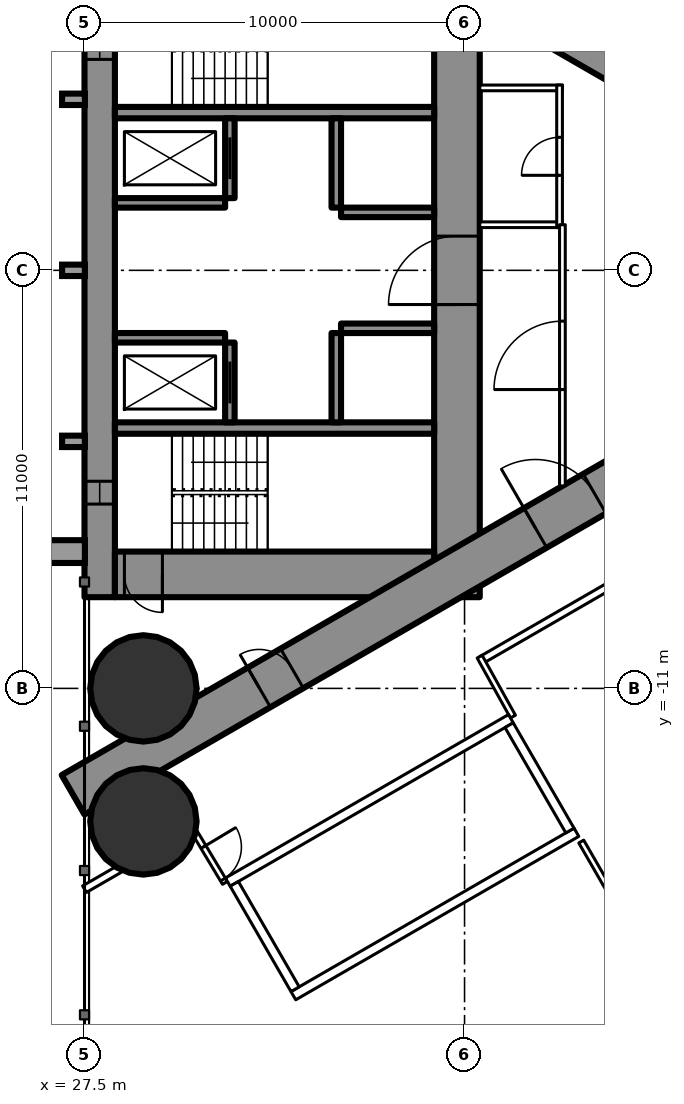
"""IFC4 building model, lengths in metres.
Left out: names, types, materials, properties, quantities, classifications, styles, units other than length and angle.
Written with IfcOpenShell. Run it as: python <this file> out.ifc"""

import sys

from ifc_helpers import new_model, si_unit, direction, frame, frame_2d, origin, origin_2d, place, context, subcontext, project, spatial, rectangle, hollow_circle, extrude, element, fill, save


model = new_model("IFC4")
c1 = context("Model", 3, precision=1e-05, world=origin(), true_north=direction((0.0, 1.0)))
c2 = subcontext(c1, "Body", "Model", "MODEL_VIEW")
j1 = project(units=[si_unit("LENGTHUNIT", "METRE"), si_unit("PLANEANGLEUNIT", "RADIAN")], contexts=[c1])
p1 = place(None, origin())
s1 = spatial("IfcSite", under=j1, at=p1, CompositionType="ELEMENT")
p2 = place(p1, origin())
s2 = spatial("IfcBuilding", under=s1, at=p2, CompositionType="ELEMENT")
p3 = place(p2, frame((0.0, 0.0, 77.5)))
s3 = spatial("IfcBuildingStorey", under=s2, at=p3, CompositionType="ELEMENT", Elevation=77.5)
for number, where, z_axis, x_axis in (
    (1, (29.05, -11.0, 0.0), (0.0, 0.0, 1.0), (1.0, 0.0, 0.0)),
    (2, (29.05, -14.5, 0.0), (0.0, 0.0, 1.0), (1.0, 0.0, 0.0)),
):
    element("IfcColumn", number, at=place(p3, frame(where, z_axis=z_axis, x_axis=x_axis)), inside=s3, PredefinedType="COLUMN", context=c2, shape_type="SweptSolid", body=[
        extrude(hollow_circle(Radius=1.4, WallThickness=0.12, at=origin_2d()), origin(), (0.0, 0.0, 1.0), 3.5),
    ])
p4 = place(p3, frame((27.9, -8.6, 0.0), z_axis=(0.0, 0.0, 1.0), x_axis=(0.0, 1.0, 0.0)))
e3 = element("IfcWall", 3, at=p4, inside=s3, PredefinedType="SHEAR", context=c2, shape_type="SweptSolid", body=[
    extrude(rectangle(XDim=17.2, YDim=0.8, at=frame_2d((8.6, 0.0))), origin(), (0.0, 0.0, 1.0), 3.5),
])
p5 = place(p4, frame((2.45, 0.0, 0.6)))
e4 = element("IfcOpeningElement", 4, at=p5, cuts=e3, PredefinedType="OPENING", context=c2, shape_type="SweptSolid", body=[
    extrude(rectangle(XDim=0.6, YDim=2.1, at=frame_2d((0.3, 1.05))), frame((0.0, 0.41, 0.0), z_axis=(0.0, -1.0, 0.0), x_axis=(1.0, 0.0, 0.0)), (0.0, 0.0, 1.0), 0.82),
])
p6 = place(p4, frame((14.15, 0.0, 0.6)))
e5 = element("IfcOpeningElement", 5, at=p6, cuts=e3, PredefinedType="OPENING", context=c2, shape_type="SweptSolid", body=[
    extrude(rectangle(XDim=0.6, YDim=2.1, at=frame_2d((0.3, 1.05))), frame((0.0, 0.41, 0.0), z_axis=(0.0, -1.0, 0.0), x_axis=(1.0, 0.0, 0.0)), (0.0, 0.0, 1.0), 0.82),
])
p7 = place(p3, frame((37.3, -8.6, 0.0), z_axis=(0.0, 0.0, 1.0), x_axis=(0.0, 1.0, 0.0)))
e6 = element("IfcWall", 6, at=p7, inside=s3, PredefinedType="SHEAR", context=c2, shape_type="SweptSolid", body=[
    extrude(rectangle(XDim=17.2, YDim=1.2, at=frame_2d((8.6, 0.0))), origin(), (0.0, 0.0, 1.0), 3.5),
])
p8 = place(p7, frame((7.7, 0.0, 0.0)))
e7 = element("IfcOpeningElement", 7, at=p8, cuts=e6, PredefinedType="OPENING", context=c2, shape_type="SweptSolid", body=[
    extrude(rectangle(XDim=1.8, YDim=2.2, at=frame_2d((0.9, 1.1))), frame((0.0, 0.61, 0.0), z_axis=(0.0, -1.0, 0.0), x_axis=(1.0, 0.0, 0.0)), (0.0, 0.0, 1.0), 1.22),
])
p9 = place(p3, frame((28.3, -8.0, 0.0), z_axis=(0.0, 0.0, 1.0), x_axis=(1.0, 0.0, 0.0)))
e8 = element("IfcWall", 8, at=p9, inside=s3, PredefinedType="SHEAR", context=c2, shape_type="SweptSolid", body=[
    extrude(rectangle(XDim=8.4, YDim=1.2, at=frame_2d((4.2, 0.0))), origin(), (0.0, 0.0, 1.0), 3.5),
])
p10 = place(p9, frame((0.25, 0.0, 0.0)))
e9 = element("IfcOpeningElement", 9, at=p10, cuts=e8, PredefinedType="OPENING", context=c2, shape_type="SweptSolid", body=[
    extrude(rectangle(XDim=1.0, YDim=2.2, at=frame_2d((0.5, 1.1))), frame((0.0, 0.61, 0.0), z_axis=(0.0, -1.0, 0.0), x_axis=(1.0, 0.0, 0.0)), (0.0, 0.0, 1.0), 1.22),
])
for number, where, z_axis, x_axis in (
    (10, (28.3, -4.15, 0.0), (0.0, 0.0, 1.0), (1.0, 0.0, 0.0)),
    (11, (28.3, 4.15, 0.0), (0.0, 0.0, 1.0), (1.0, 0.0, 0.0)),
):
    element("IfcWall", number, at=place(p3, frame(where, z_axis=z_axis, x_axis=x_axis)), inside=s3, PredefinedType="SHEAR", context=c2, shape_type="SweptSolid", body=[
        extrude(rectangle(XDim=8.4, YDim=0.3, at=frame_2d((4.2, 0.0))), origin(), (0.0, 0.0, 1.0), 3.5),
    ])
p11 = place(p3, frame((31.325, -4.0, 0.0), z_axis=(0.0, 0.0, 1.0), x_axis=(0.0, 1.0, 0.0)))
e12 = element("IfcWall", 12, at=p11, inside=s3, PredefinedType="SHEAR", context=c2, shape_type="SweptSolid", body=[
    extrude(rectangle(XDim=2.1, YDim=0.25, at=frame_2d((1.05, 0.0))), origin(), (0.0, 0.0, 1.0), 3.5),
])
p12 = place(p11, frame((0.5, 0.0, 0.0)))
e13 = element("IfcOpeningElement", 13, at=p12, cuts=e12, PredefinedType="OPENING", context=c2, shape_type="SweptSolid", body=[
    extrude(rectangle(XDim=1.1, YDim=2.2, at=frame_2d((0.55, 1.1))), frame((0.0, 0.135, 0.0), z_axis=(0.0, -1.0, 0.0), x_axis=(1.0, 0.0, 0.0)), (0.0, 0.0, 1.0), 0.27),
])
p13 = place(p3, frame((34.125, -4.0, 0.0), z_axis=(0.0, 0.0, 1.0), x_axis=(0.0, 1.0, 0.0)))
e14 = element("IfcWall", 14, at=p13, inside=s3, PredefinedType="SHEAR", context=c2, shape_type="SweptSolid", body=[
    extrude(rectangle(XDim=2.35, YDim=0.25, at=frame_2d((1.175, 0.0))), origin(), (0.0, 0.0, 1.0), 3.5),
])
p14 = place(p3, frame((28.3, -1.775, 0.0), z_axis=(0.0, 0.0, 1.0), x_axis=(1.0, 0.0, 0.0)))
e15 = element("IfcWall", 15, at=p14, inside=s3, PredefinedType="SHEAR", context=c2, shape_type="SweptSolid", body=[
    extrude(rectangle(XDim=2.9, YDim=0.25, at=frame_2d((1.45, 0.0))), origin(), (0.0, 0.0, 1.0), 3.5),
])
p15 = place(p3, frame((34.25, -1.525, 0.0), z_axis=(0.0, 0.0, 1.0), x_axis=(1.0, 0.0, 0.0)))
e16 = element("IfcWall", 16, at=p15, inside=s3, PredefinedType="SHEAR", context=c2, shape_type="SweptSolid", body=[
    extrude(rectangle(XDim=2.45, YDim=0.25, at=frame_2d((1.225, 0.0))), origin(), (0.0, 0.0, 1.0), 3.5),
])
p16 = place(p3, frame((31.325, 1.9, 0.0), z_axis=(0.0, 0.0, 1.0), x_axis=(0.0, 1.0, 0.0)))
e17 = element("IfcWall", 17, at=p16, inside=s3, PredefinedType="SHEAR", context=c2, shape_type="SweptSolid", body=[
    extrude(rectangle(XDim=2.1, YDim=0.25, at=frame_2d((1.05, 0.0))), origin(), (0.0, 0.0, 1.0), 3.5),
])
p17 = place(p16, frame((0.5, 0.0, 0.0)))
e18 = element("IfcOpeningElement", 18, at=p17, cuts=e17, PredefinedType="OPENING", context=c2, shape_type="SweptSolid", body=[
    extrude(rectangle(XDim=1.1, YDim=2.2, at=frame_2d((0.55, 1.1))), frame((0.0, 0.135, 0.0), z_axis=(0.0, -1.0, 0.0), x_axis=(1.0, 0.0, 0.0)), (0.0, 0.0, 1.0), 0.27),
])
p18 = place(p3, frame((34.125, 1.65, 0.0), z_axis=(0.0, 0.0, 1.0), x_axis=(0.0, 1.0, 0.0)))
e19 = element("IfcWall", 19, at=p18, inside=s3, PredefinedType="SHEAR", context=c2, shape_type="SweptSolid", body=[
    extrude(rectangle(XDim=2.35, YDim=0.25, at=frame_2d((1.175, 0.0))), origin(), (0.0, 0.0, 1.0), 3.5),
])
p19 = place(p3, frame((28.3, 1.775, 0.0), z_axis=(0.0, 0.0, 1.0), x_axis=(1.0, 0.0, 0.0)))
e20 = element("IfcWall", 20, at=p19, inside=s3, PredefinedType="SHEAR", context=c2, shape_type="SweptSolid", body=[
    extrude(rectangle(XDim=2.9, YDim=0.25, at=frame_2d((1.45, 0.0))), origin(), (0.0, 0.0, 1.0), 3.5),
])
p20 = place(p3, frame((34.25, 1.525, 0.0), z_axis=(0.0, 0.0, 1.0), x_axis=(1.0, 0.0, 0.0)))
e21 = element("IfcWall", 21, at=p20, inside=s3, PredefinedType="SHEAR", context=c2, shape_type="SweptSolid", body=[
    extrude(rectangle(XDim=2.45, YDim=0.25, at=frame_2d((1.225, 0.0))), origin(), (0.0, 0.0, 1.0), 3.5),
])
p21 = place(p3, frame((27.2, -13.8, 0.0), z_axis=(0.0, 0.0, 1.0), x_axis=(0.866027159892, 0.499996958321, 0.0)))
e22 = element("IfcWall", 22, at=p21, inside=s3, PredefinedType="SHEAR", context=c2, shape_type="SweptSolid", body=[
    extrude(rectangle(XDim=27.947, YDim=1.2, at=frame_2d((13.973, 0.0))), origin(), (0.0, 0.0, 1.0), 3.5),
])
p22 = place(p21, frame((5.65, 0.0, 0.0)))
e23 = element("IfcOpeningElement", 23, at=p22, cuts=e22, PredefinedType="OPENING", context=c2, shape_type="SweptSolid", body=[
    extrude(rectangle(XDim=1.0, YDim=2.2, at=frame_2d((0.5, 1.1))), frame((0.0, 0.61, 0.0), z_axis=(0.0, -1.0, 0.0), x_axis=(1.0, 0.0, 0.0)), (0.0, 0.0, 1.0), 1.22),
])
p23 = place(p21, frame((14.045, 0.0, 0.0)))
e24 = element("IfcOpeningElement", 24, at=p23, cuts=e22, PredefinedType="OPENING", context=c2, shape_type="SweptSolid", body=[
    extrude(rectangle(XDim=1.8, YDim=2.2, at=frame_2d((0.9, 1.1))), frame((0.0, 0.61, 0.0), z_axis=(0.0, -1.0, 0.0), x_axis=(1.0, 0.0, 0.0)), (0.0, 0.0, 1.0), 1.22),
])
p24 = place(p3, frame((27.2, 13.8, 0.0), z_axis=(0.0, 0.0, 1.0), x_axis=(0.866024515034, -0.500001539357, 0.0)))
e25 = element("IfcWall", 25, at=p24, inside=s3, PredefinedType="SHEAR", context=c2, shape_type="SweptSolid", body=[
    extrude(rectangle(XDim=26.907, YDim=1.2, at=frame_2d((13.454, 0.0))), origin(), (0.0, 0.0, 1.0), 3.5),
])
p25 = place(p24, frame((4.5, 0.0, 0.0)))
e26 = element("IfcOpeningElement", 26, at=p25, cuts=e25, PredefinedType="OPENING", context=c2, shape_type="SweptSolid", body=[
    extrude(rectangle(XDim=1.0, YDim=2.2, at=frame_2d((0.5, 1.1))), frame((0.0, 0.61, 0.0), z_axis=(0.0, -1.0, 0.0), x_axis=(1.0, 0.0, 0.0)), (0.0, 0.0, 1.0), 1.22),
])
p26 = place(p24, frame((12.545, 0.0, 0.0)))
e27 = element("IfcOpeningElement", 27, at=p26, cuts=e25, PredefinedType="OPENING", context=c2, shape_type="SweptSolid", body=[
    extrude(rectangle(XDim=1.8, YDim=2.2, at=frame_2d((0.9, 1.1))), frame((0.0, 0.61, 0.0), z_axis=(0.0, -1.0, 0.0), x_axis=(1.0, 0.0, 0.0)), (0.0, 0.0, 1.0), 1.22),
])
p27 = place(p3, frame((29.911, -25.002, 0.0), z_axis=(0.0, 0.0, 1.0), x_axis=(0.935736448066, 0.352700013836, 0.0)))
e28 = element("IfcWall", 28, at=p27, inside=s3, PredefinedType="SHEAR", context=c2, shape_type="SweptSolid", body=[
    extrude(rectangle(XDim=14.505, YDim=1.4, at=frame_2d((7.252, 0.0))), origin(), (0.0, 0.0, 1.0), 3.5),
])
p28 = place(p27, frame((5.752, 0.0, 0.6)))
e29 = element("IfcOpeningElement", 29, at=p28, cuts=e28, PredefinedType="OPENING", context=c2, shape_type="SweptSolid", body=[
    extrude(rectangle(XDim=3.0, YDim=1.2, at=frame_2d((1.5, 0.6))), frame((0.0, 0.71, 0.0), z_axis=(0.0, -1.0, 0.0), x_axis=(1.0, 0.0, 0.0)), (0.0, 0.0, 1.0), 1.42),
])
p29 = place(p3, frame((40.57, -15.03, 0.0), z_axis=(0.0, 0.0, 1.0), x_axis=(0.500012993597, -0.866017901798, 0.0)))
e30 = element("IfcWall", 30, at=p29, inside=s3, PredefinedType="PARTITIONING", context=c2, shape_type="SweptSolid", body=[
    extrude(rectangle(XDim=4.243, YDim=0.15, at=frame_2d((2.122, 0.0))), origin(), (0.0, 0.0, 1.0), 3.25),
])
p30 = place(p3, frame((27.5, -16.282, 0.0), z_axis=(0.0, 0.0, 1.0), x_axis=(0.866039938485, 0.499974824316, 0.0)))
e31 = element("IfcWall", 31, at=p30, inside=s3, PredefinedType="PARTITIONING", context=c2, shape_type="SweptSolid", body=[
    extrude(rectangle(XDim=3.238, YDim=0.2, at=frame_2d((1.619, 0.0))), origin(), (0.0, 0.0, 1.0), 3.25),
])
p31 = place(p3, frame((37.96, -10.243, 0.0), z_axis=(0.0, 0.0, 1.0), x_axis=(0.866026429433, 0.499998223521, 0.0)))
e32 = element("IfcWall", 32, at=p31, inside=s3, PredefinedType="PARTITIONING", context=c2, shape_type="SweptSolid", body=[
    extrude(rectangle(XDim=20.487, YDim=0.2, at=frame_2d((10.243, 0.0))), origin(), (0.0, 0.0, 1.0), 3.25),
])
p32 = place(p31, frame((14.142, 0.0, 0.0)))
e33 = element("IfcOpeningElement", 33, at=p32, cuts=e32, PredefinedType="OPENING", context=c2, shape_type="SweptSolid", body=[
    extrude(rectangle(XDim=1.8, YDim=2.2, at=frame_2d((0.9, 1.1))), frame((0.0, 0.11, 0.0), z_axis=(0.0, -1.0, 0.0), x_axis=(1.0, 0.0, 0.0)), (0.0, 0.0, 1.0), 0.22),
])
p33 = place(p31, frame((17.836, 0.0, 0.0)))
e34 = element("IfcOpeningElement", 34, at=p33, cuts=e32, PredefinedType="OPENING", context=c2, shape_type="SweptSolid", body=[
    extrude(rectangle(XDim=1.8, YDim=2.04, at=frame_2d((0.9, 1.02))), frame((0.0, 0.11, 0.0), z_axis=(0.0, -1.0, 0.0), x_axis=(1.0, 0.0, 0.0)), (0.0, 0.0, 1.0), 0.22),
])
p34 = place(p31, frame((5.55, 0.0, 0.0)))
e35 = element("IfcOpeningElement", 35, at=p34, cuts=e32, PredefinedType="OPENING", context=c2, shape_type="SweptSolid", body=[
    extrude(rectangle(XDim=2.0, YDim=2.4, at=frame_2d((1.0, 1.2))), frame((0.0, 0.11, 0.0), z_axis=(0.0, -1.0, 0.0), x_axis=(1.0, 0.0, 0.0)), (0.0, 0.0, 1.0), 0.22),
])
p35 = place(p3, frame((36.834, 10.894, 0.0), z_axis=(0.0, 0.0, 1.0), x_axis=(0.866028157229, -0.499995230863, 0.0)))
e36 = element("IfcWall", 36, at=p35, inside=s3, PredefinedType="PARTITIONING", context=c2, shape_type="SweptSolid", body=[
    extrude(rectangle(XDim=21.667, YDim=0.2, at=frame_2d((10.833, 0.0))), origin(), (0.0, 0.0, 1.0), 3.25),
])
p36 = place(p35, frame((19.076, 0.0, 0.0)))
e37 = element("IfcOpeningElement", 37, at=p36, cuts=e36, PredefinedType="OPENING", context=c2, shape_type="SweptSolid", body=[
    extrude(rectangle(XDim=1.8, YDim=2.04, at=frame_2d((0.9, 1.02))), frame((0.0, 0.11, 0.0), z_axis=(0.0, -1.0, 0.0), x_axis=(1.0, 0.0, 0.0)), (0.0, 0.0, 1.0), 0.22),
])
p37 = place(p35, frame((13.274, 0.0, 0.0)))
e38 = element("IfcOpeningElement", 38, at=p37, cuts=e36, PredefinedType="OPENING", context=c2, shape_type="SweptSolid", body=[
    extrude(rectangle(XDim=1.8, YDim=2.2, at=frame_2d((0.9, 1.1))), frame((0.0, 0.11, 0.0), z_axis=(0.0, -1.0, 0.0), x_axis=(1.0, 0.0, 0.0)), (0.0, 0.0, 1.0), 0.22),
])
p38 = place(p35, frame((4.602, 0.0, 0.0)))
e39 = element("IfcOpeningElement", 39, at=p38, cuts=e36, PredefinedType="OPENING", context=c2, shape_type="SweptSolid", body=[
    extrude(rectangle(XDim=1.8, YDim=2.2, at=frame_2d((0.9, 1.1))), frame((0.0, 0.11, 0.0), z_axis=(0.0, -1.0, 0.0), x_axis=(1.0, 0.0, 0.0)), (0.0, 0.0, 1.0), 0.22),
])
p39 = place(p3, frame((30.267, -14.569, 0.0), z_axis=(0.0, 0.0, 1.0), x_axis=(0.514336634837, -0.857588377991, 0.0)))
e40 = element("IfcWall", 40, at=p39, inside=s3, PredefinedType="PARTITIONING", context=c2, shape_type="SweptSolid", body=[
    extrude(rectangle(XDim=1.805, YDim=0.15, at=frame_2d((0.903, 0.0))), origin(), (0.0, 0.0, 1.0), 3.25),
])
p40 = place(p39, frame((0.703, 0.0, 0.0)))
e41 = element("IfcOpeningElement", 41, at=p40, cuts=e40, PredefinedType="OPENING", context=c2, shape_type="SweptSolid", body=[
    extrude(rectangle(XDim=1.0, YDim=2.04, at=frame_2d((0.5, 1.02))), frame((0.0, 0.085, 0.0), z_axis=(0.0, -1.0, 0.0), x_axis=(1.0, 0.0, 0.0)), (0.0, 0.0, 1.0), 0.17),
])
p41 = place(p3, frame((38.773, -11.742, 0.0), z_axis=(0.0, 0.0, 1.0), x_axis=(-0.485528096672, 0.8742210632, 0.0)))
e42 = element("IfcWall", 42, at=p41, inside=s3, PredefinedType="PARTITIONING", context=c2, shape_type="SweptSolid", body=[
    extrude(rectangle(XDim=1.805, YDim=0.15, at=frame_2d((0.903, 0.0))), origin(), (0.0, 0.0, 1.0), 3.25),
])
for number, where, z_axis, x_axis in (
    (43, (37.9, 1.2, 0.0), (0.0, 0.0, 1.0), (1.0, 0.0, 0.0)),
    (44, (37.9, 4.8, 0.0), (0.0, 0.0, 1.0), (1.0, 0.0, 0.0)),
):
    element("IfcWall", number, at=place(p3, frame(where, z_axis=z_axis, x_axis=x_axis)), inside=s3, PredefinedType="PARTITIONING", context=c2, shape_type="SweptSolid", body=[
        extrude(rectangle(XDim=2.175, YDim=0.15, at=frame_2d((1.087, 0.0))), origin(), (0.0, 0.0, 1.0), 3.25),
    ])
p42 = place(p3, frame((40.0, 1.125, 0.0), z_axis=(0.0, 0.0, 1.0), x_axis=(0.0, 1.0, 0.0)))
e45 = element("IfcWall", 45, at=p42, inside=s3, PredefinedType="PARTITIONING", context=c2, shape_type="SweptSolid", body=[
    extrude(rectangle(XDim=3.75, YDim=0.15, at=frame_2d((1.875, 0.0))), origin(), (0.0, 0.0, 1.0), 3.25),
])
p43 = place(p42, frame((1.375, 0.0, 0.0)))
e46 = element("IfcOpeningElement", 46, at=p43, cuts=e45, PredefinedType="OPENING", context=c2, shape_type="SweptSolid", body=[
    extrude(rectangle(XDim=1.0, YDim=2.2, at=frame_2d((0.5, 1.1))), frame((0.0, 0.085, 0.0), z_axis=(0.0, -1.0, 0.0), x_axis=(1.0, 0.0, 0.0)), (0.0, 0.0, 1.0), 0.17),
])
p44 = place(p3, frame((40.075, -5.674, 0.0), z_axis=(0.0, 0.0, 1.0), x_axis=(0.0, 1.0, 0.0)))
e47 = element("IfcWall", 47, at=p44, inside=s3, PredefinedType="PARTITIONING", context=c2, shape_type="SweptSolid", body=[
    extrude(rectangle(XDim=6.874, YDim=0.15, at=frame_2d((3.437, 0.0))), origin(), (0.0, 0.0, 1.0), 3.25),
])
p45 = place(p44, frame((2.537, 0.0, 0.0)))
e48 = element("IfcOpeningElement", 48, at=p45, cuts=e47, PredefinedType="OPENING", context=c2, shape_type="SweptSolid", body=[
    extrude(rectangle(XDim=1.8, YDim=2.2, at=frame_2d((0.9, 1.1))), frame((0.0, 0.085, 0.0), z_axis=(0.0, -1.0, 0.0), x_axis=(1.0, 0.0, 0.0)), (0.0, 0.0, 1.0), 0.17),
])
for number, where, z_axis, x_axis in (
    (49, (31.271, -16.097, 0.0), (0.0, 0.0, 1.0), (0.866, 0.5, 0.0)),
    (50, (32.996, -19.086, 0.0), (0.0, 0.0, 1.0), (0.866, 0.5, 0.0)),
):
    element("IfcWall", number, at=place(p3, frame(where, z_axis=z_axis, x_axis=x_axis)), inside=s3, PredefinedType="PARTITIONING", context=c2, shape_type="SweptSolid", body=[
        extrude(rectangle(XDim=8.6, YDim=0.25, at=frame_2d((4.3, 0.0))), origin(), (0.0, 0.0, 1.0), 3.25),
    ])
for number, where, z_axis, x_axis in (
    (51, (31.441, -16.143, 0.0), (0.0, 0.0, 1.0), (0.5, -0.866, 0.0)),
    (52, (38.673, -11.968, 0.0), (0.0, 0.0, 1.0), (0.5, -0.866, 0.0)),
):
    element("IfcWall", number, at=place(p3, frame(where, z_axis=z_axis, x_axis=x_axis)), inside=s3, PredefinedType="PARTITIONING", context=c2, shape_type="SweptSolid", body=[
        extrude(rectangle(XDim=3.201, YDim=0.25, at=frame_2d((1.6, 0.0))), origin(), (0.0, 0.0, 1.0), 3.25),
    ])
p46 = place(p40, origin())
e53 = element("IfcDoor", 53, at=p46, inside=s3, OperationType="SINGLE_SWING_LEFT", PredefinedType="DOOR", context=c2, shape_type="SweptSolid", body=[
    extrude(rectangle(XDim=1.0, YDim=2.04, at=frame_2d((0.5, 1.02))), frame((0.0, 0.025, 0.0), z_axis=(0.0, -1.0, 0.0), x_axis=(1.0, 0.0, 0.0)), (0.0, 0.0, 1.0), 0.05),
])
fill(e41, e53)
p47 = place(p43, origin())
e54 = element("IfcDoor", 54, at=p47, inside=s3, OperationType="SINGLE_SWING_LEFT", PredefinedType="DOOR", context=c2, shape_type="SweptSolid", body=[
    extrude(rectangle(XDim=1.0, YDim=2.2, at=frame_2d((0.5, 1.1))), frame((0.0, 0.025, 0.0), z_axis=(0.0, -1.0, 0.0), x_axis=(1.0, 0.0, 0.0)), (0.0, 0.0, 1.0), 0.05),
])
fill(e46, e54)
p48 = place(p45, origin())
e55 = element("IfcDoor", 55, at=p48, inside=s3, OperationType="DOUBLE_DOOR_SINGLE_SWING", PredefinedType="DOOR", context=c2, shape_type="SweptSolid", body=[
    extrude(rectangle(XDim=1.8, YDim=2.2, at=frame_2d((0.9, 1.1))), frame((0.0, 0.025, 0.0), z_axis=(0.0, -1.0, 0.0), x_axis=(1.0, 0.0, 0.0)), (0.0, 0.0, 1.0), 0.05),
])
fill(e48, e55)
p49 = place(p22, origin())
e56 = element("IfcDoor", 56, at=p49, inside=s3, OperationType="SINGLE_SWING_LEFT", PredefinedType="DOOR", context=c2, shape_type="SweptSolid", body=[
    extrude(rectangle(XDim=1.0, YDim=2.2, at=frame_2d((0.5, 1.1))), frame((0.0, 0.025, 0.0), z_axis=(0.0, -1.0, 0.0), x_axis=(1.0, 0.0, 0.0)), (0.0, 0.0, 1.0), 0.05),
])
fill(e23, e56)
p50 = place(p23, origin())
e57 = element("IfcDoor", 57, at=p50, inside=s3, OperationType="DOUBLE_DOOR_SINGLE_SWING", PredefinedType="DOOR", context=c2, shape_type="SweptSolid", body=[
    extrude(rectangle(XDim=1.8, YDim=2.2, at=frame_2d((0.9, 1.1))), frame((0.0, 0.025, 0.0), z_axis=(0.0, -1.0, 0.0), x_axis=(1.0, 0.0, 0.0)), (0.0, 0.0, 1.0), 0.05),
])
fill(e24, e57)
p51 = place(p8, origin())
e58 = element("IfcDoor", 58, at=p51, inside=s3, OperationType="DOUBLE_DOOR_SINGLE_SWING", PredefinedType="DOOR", context=c2, shape_type="SweptSolid", body=[
    extrude(rectangle(XDim=1.8, YDim=2.2, at=frame_2d((0.9, 1.1))), frame((0.0, 0.025, 0.0), z_axis=(0.0, -1.0, 0.0), x_axis=(1.0, 0.0, 0.0)), (0.0, 0.0, 1.0), 0.05),
])
fill(e7, e58)
p52 = place(p10, origin())
e59 = element("IfcDoor", 59, at=p52, inside=s3, OperationType="SINGLE_SWING_RIGHT", PredefinedType="DOOR", context=c2, shape_type="SweptSolid", body=[
    extrude(rectangle(XDim=1.0, YDim=2.2, at=frame_2d((0.5, 1.1))), frame((0.0, 0.025, 0.0), z_axis=(0.0, -1.0, 0.0), x_axis=(1.0, 0.0, 0.0)), (0.0, 0.0, 1.0), 0.05),
])
fill(e9, e59)
p53 = place(p12, origin())
e60 = element("IfcDoor", 60, at=p53, inside=s3, OperationType="SLIDING_TO_LEFT", PredefinedType="USERDEFINED", context=c2, shape_type="SweptSolid", body=[
    extrude(rectangle(XDim=1.1, YDim=2.2, at=frame_2d((0.55, 1.1))), frame((0.0, 0.025, 0.0), z_axis=(0.0, -1.0, 0.0), x_axis=(1.0, 0.0, 0.0)), (0.0, 0.0, 1.0), 0.05),
])
fill(e13, e60)
p54 = place(p17, origin())
e61 = element("IfcDoor", 61, at=p54, inside=s3, OperationType="SLIDING_TO_LEFT", PredefinedType="USERDEFINED", context=c2, shape_type="SweptSolid", body=[
    extrude(rectangle(XDim=1.1, YDim=2.2, at=frame_2d((0.55, 1.1))), frame((0.0, 0.025, 0.0), z_axis=(0.0, -1.0, 0.0), x_axis=(1.0, 0.0, 0.0)), (0.0, 0.0, 1.0), 0.05),
])
fill(e18, e61)
p55 = place(p5, origin())
e62 = element("IfcWindow", 62, at=p55, inside=s3, PartitioningType="SINGLE_PANEL", PredefinedType="WINDOW", context=c2, shape_type="SweptSolid", body=[
    extrude(rectangle(XDim=0.6, YDim=2.1, at=frame_2d((0.3, 1.05))), frame((0.0, 0.03, 0.0), z_axis=(0.0, -1.0, 0.0), x_axis=(1.0, 0.0, 0.0)), (0.0, 0.0, 1.0), 0.06),
])
fill(e4, e62)
p56 = place(p6, origin())
e63 = element("IfcWindow", 63, at=p56, inside=s3, PartitioningType="SINGLE_PANEL", PredefinedType="WINDOW", context=c2, shape_type="SweptSolid", body=[
    extrude(rectangle(XDim=0.6, YDim=2.1, at=frame_2d((0.3, 1.05))), frame((0.0, 0.03, 0.0), z_axis=(0.0, -1.0, 0.0), x_axis=(1.0, 0.0, 0.0)), (0.0, 0.0, 1.0), 0.06),
])
fill(e5, e63)
save(model, sys.argv[1])
